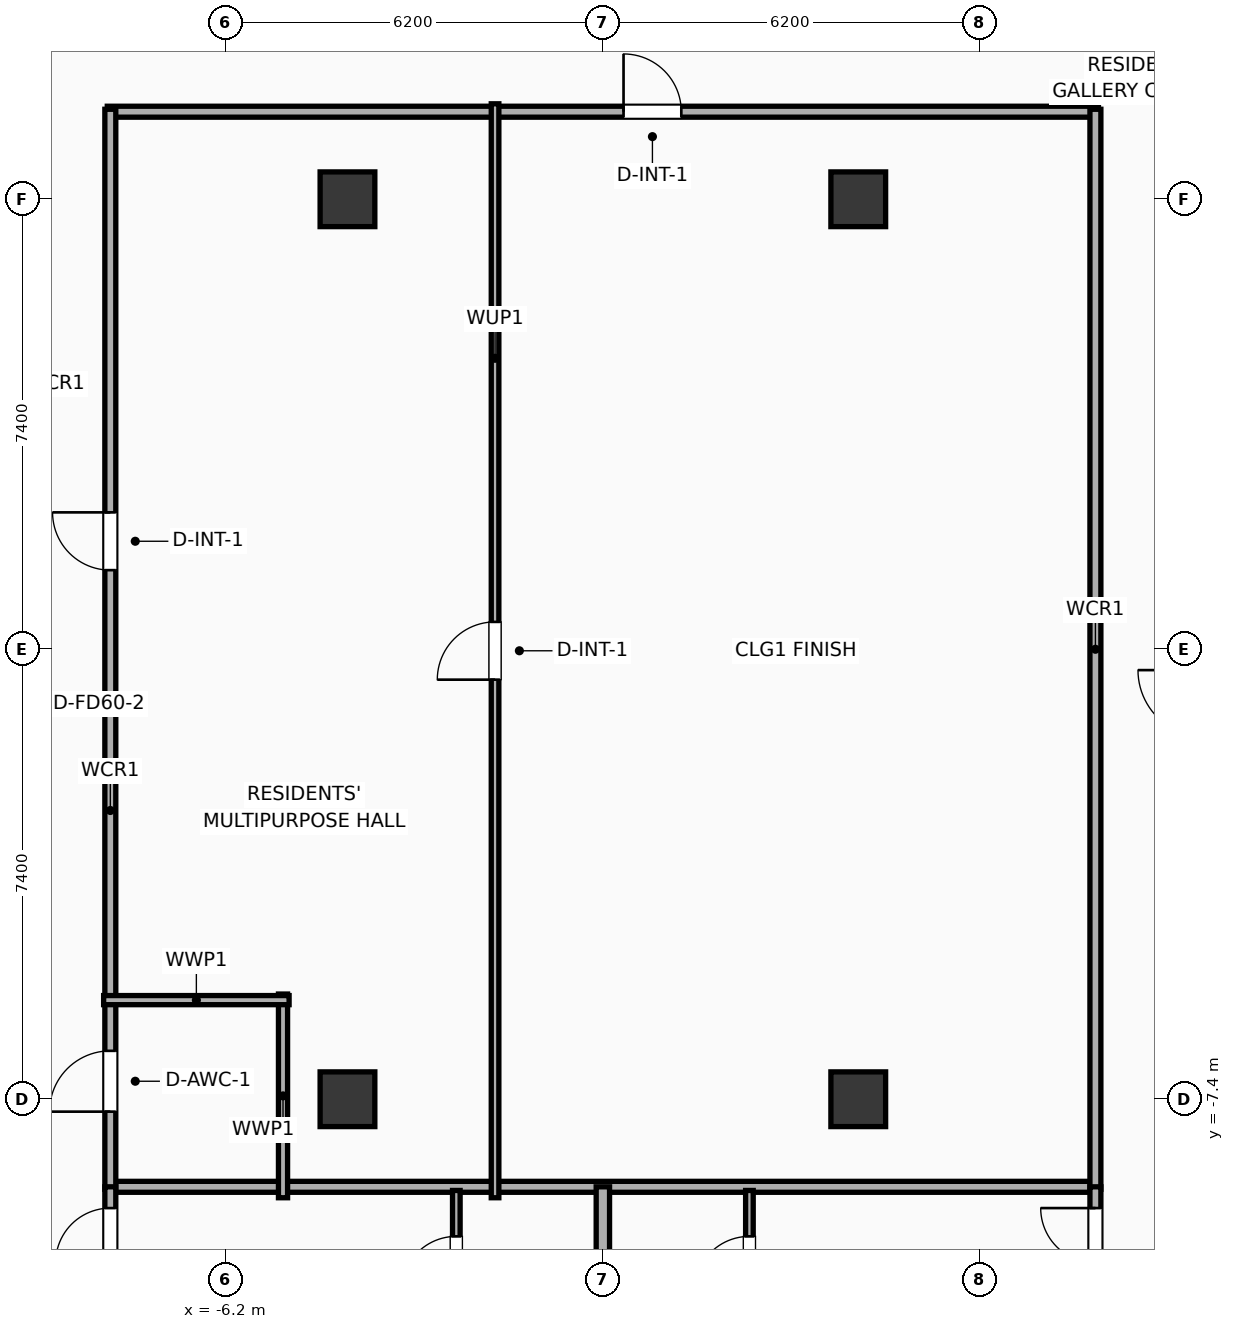
"""IFC4 building model, lengths in metres.
Left out: names, types, materials, properties, quantities, classifications, styles, units other than length and angle.
Written with IfcOpenShell. Run it as: python <this file> out.ifc"""

import sys

from ifc_helpers import new_model, si_unit, direction, frame, frame_2d, origin, origin_2d, place, context, subcontext, project, spatial, rectangle, extrude, element, fill, save


model = new_model("IFC4")
c1 = context("Model", 3, precision=1e-05, world=origin(), true_north=direction((0.0, 1.0)))
c2 = subcontext(c1, "Body", "Model", "MODEL_VIEW")
j1 = project(units=[si_unit("LENGTHUNIT", "METRE"), si_unit("PLANEANGLEUNIT", "RADIAN")], contexts=[c1])
p1 = place(None, origin())
s1 = spatial("IfcSite", under=j1, at=p1, CompositionType="ELEMENT")
p2 = place(p1, origin())
s2 = spatial("IfcBuilding", under=s1, at=p2, CompositionType="ELEMENT")
p3 = place(p2, frame((0.0, 0.0, 302.9)))
s3 = spatial("IfcBuildingStorey", under=s2, at=p3, CompositionType="ELEMENT", Elevation=302.9)
for number, where, z_axis, x_axis in (
    (1, (-4.2, -7.4, 0.0), (0.0, 0.0, 1.0), (1.0, 0.0, 0.0)),
    (2, (-4.2, 7.4, 0.0), (0.0, 0.0, 1.0), (1.0, 0.0, 0.0)),
    (3, (4.2, -7.4, 0.0), (0.0, 0.0, 1.0), (1.0, 0.0, 0.0)),
    (4, (4.2, 7.4, 0.0), (0.0, 0.0, 1.0), (1.0, 0.0, 0.0)),
):
    element("IfcColumn", number, at=place(p3, frame(where, z_axis=z_axis, x_axis=x_axis)), inside=s3, PredefinedType="COLUMN", context=c2, shape_type="SweptSolid", body=[
        extrude(rectangle(XDim=0.9, YDim=0.9, at=origin_2d()), origin(), (0.0, 0.0, 1.0), 3.9),
    ])
p4 = place(p3, frame((-8.15, 8.84, 0.0), z_axis=(0.0, 0.0, 1.0), x_axis=(1.0, 0.0, 0.0)))
e5 = element("IfcWall", 5, at=p4, inside=s3, PredefinedType="PARTITIONING", context=c2, shape_type="SweptSolid", body=[
    extrude(rectangle(XDim=16.3, YDim=0.18, at=frame_2d((8.15, 0.0))), origin(), (0.0, 0.0, 1.0), 3.635),
])
p5 = place(p4, frame((8.49, 0.0, 0.0)))
e6 = element("IfcOpeningElement", 6, at=p5, cuts=e5, PredefinedType="OPENING", context=c2, shape_type="SweptSolid", body=[
    extrude(rectangle(XDim=0.95, YDim=2.05, at=frame_2d((0.475, 1.025))), frame((0.0, 0.1, 0.0), z_axis=(0.0, -1.0, 0.0), x_axis=(1.0, 0.0, 0.0)), (0.0, 0.0, 1.0), 0.2),
])
p6 = place(p3, frame((-8.15, -8.84, 0.0), z_axis=(0.0, 0.0, 1.0), x_axis=(1.0, 0.0, 0.0)))
e7 = element("IfcWall", 7, at=p6, inside=s3, PredefinedType="PARTITIONING", context=c2, shape_type="SweptSolid", body=[
    extrude(rectangle(XDim=16.3, YDim=0.18, at=frame_2d((8.15, 0.0))), origin(), (0.0, 0.0, 1.0), 3.635),
])
p7 = place(p3, frame((-8.1, -8.88, 0.0), z_axis=(0.0, 0.0, 1.0), x_axis=(0.0, 1.0, 0.0)))
e8 = element("IfcWall", 8, at=p7, inside=s3, PredefinedType="PARTITIONING", context=c2, shape_type="SweptSolid", body=[
    extrude(rectangle(XDim=17.76, YDim=0.18, at=frame_2d((8.88, 0.0))), origin(), (0.0, 0.0, 1.0), 3.635),
])
p8 = place(p7, frame((1.276, 0.0, 0.0)))
e9 = element("IfcOpeningElement", 9, at=p8, cuts=e8, PredefinedType="OPENING", context=c2, shape_type="SweptSolid", body=[
    extrude(rectangle(XDim=1.0, YDim=2.05, at=frame_2d((0.5, 1.025))), frame((0.0, 0.1, 0.0), z_axis=(0.0, -1.0, 0.0), x_axis=(1.0, 0.0, 0.0)), (0.0, 0.0, 1.0), 0.2),
])
p9 = place(p7, frame((10.181, 0.0, 0.0)))
e10 = element("IfcOpeningElement", 10, at=p9, cuts=e8, PredefinedType="OPENING", context=c2, shape_type="SweptSolid", body=[
    extrude(rectangle(XDim=0.95, YDim=2.05, at=frame_2d((0.475, 1.025))), frame((0.0, 0.1, 0.0), z_axis=(0.0, -1.0, 0.0), x_axis=(1.0, 0.0, 0.0)), (0.0, 0.0, 1.0), 0.2),
])
p10 = place(p3, frame((8.1, -8.88, 0.0), z_axis=(0.0, 0.0, 1.0), x_axis=(0.0, 1.0, 0.0)))
e11 = element("IfcWall", 11, at=p10, inside=s3, PredefinedType="PARTITIONING", context=c2, shape_type="SweptSolid", body=[
    extrude(rectangle(XDim=17.76, YDim=0.18, at=frame_2d((8.88, 0.0))), origin(), (0.0, 0.0, 1.0), 3.635),
])
p11 = place(p3, frame((-5.26, -9.02, 0.0), z_axis=(0.0, 0.0, 1.0), x_axis=(0.0, 1.0, 0.0)))
e12 = element("IfcWall", 12, at=p11, inside=s3, PredefinedType="PLUMBINGWALL", context=c2, shape_type="SweptSolid", body=[
    extrude(rectangle(XDim=3.35, YDim=0.15, at=frame_2d((1.675, 0.0))), origin(), (0.0, 0.0, 1.0), 3.635),
])
p12 = place(p3, frame((-8.21, -5.77, 0.0), z_axis=(0.0, 0.0, 1.0), x_axis=(1.0, 0.0, 0.0)))
e13 = element("IfcWall", 13, at=p12, inside=s3, PredefinedType="PLUMBINGWALL", context=c2, shape_type="SweptSolid", body=[
    extrude(rectangle(XDim=3.05, YDim=0.15, at=frame_2d((1.525, 0.0))), origin(), (0.0, 0.0, 1.0), 3.635),
])
p13 = place(p3, frame((-1.773, -9.02, 0.0), z_axis=(0.0, 0.0, 1.0), x_axis=(0.0, 1.0, 0.0)))
e14 = element("IfcWall", 14, at=p13, inside=s3, PredefinedType="PARTITIONING", context=c2, shape_type="SweptSolid", body=[
    extrude(rectangle(XDim=17.99, YDim=0.125, at=frame_2d((8.995, 0.0))), origin(), (0.0, 0.0, 1.0), 3.635),
])
p14 = place(p13, frame((8.52, 0.0, 0.0)))
e15 = element("IfcOpeningElement", 15, at=p14, cuts=e14, PredefinedType="OPENING", context=c2, shape_type="SweptSolid", body=[
    extrude(rectangle(XDim=0.95, YDim=2.05, at=frame_2d((0.475, 1.025))), frame((0.0, 0.073, 0.0), z_axis=(0.0, -1.0, 0.0), x_axis=(1.0, 0.0, 0.0)), (0.0, 0.0, 1.0), 0.145),
])
p15 = place(p3, frame((-2.41, -11.31, 0.0), z_axis=(0.0, 0.0, 1.0), x_axis=(0.0, 1.0, 0.0)))
e16 = element("IfcWall", 16, at=p15, inside=s3, PredefinedType="PARTITIONING", context=c2, shape_type="SweptSolid", body=[
    extrude(rectangle(XDim=2.41, YDim=0.125, at=frame_2d((1.205, 0.0))), origin(), (0.0, 0.0, 1.0), 3.635),
])
p16 = place(p15, frame((0.755, 0.0, 0.0)))
e17 = element("IfcOpeningElement", 17, at=p16, cuts=e16, PredefinedType="OPENING", context=c2, shape_type="SweptSolid", body=[
    extrude(rectangle(XDim=0.9, YDim=2.05, at=frame_2d((0.45, 1.025))), frame((0.0, 0.073, 0.0), z_axis=(0.0, -1.0, 0.0), x_axis=(1.0, 0.0, 0.0)), (0.0, 0.0, 1.0), 0.145),
])
p17 = place(p3, frame((-8.1, -18.155, 0.0), z_axis=(0.0, 0.0, 1.0), x_axis=(0.0, 1.0, 0.0)))
e18 = element("IfcWall", 18, at=p17, inside=s3, PredefinedType="PARTITIONING", context=c2, shape_type="SweptSolid", body=[
    extrude(rectangle(XDim=9.314, YDim=0.18, at=frame_2d((4.657, 0.0))), origin(), (0.0, 0.0, 1.0), 3.635),
])
p18 = place(p17, frame((8.064, 0.0, 0.0)))
e19 = element("IfcOpeningElement", 19, at=p18, cuts=e18, PredefinedType="OPENING", context=c2, shape_type="SweptSolid", body=[
    extrude(rectangle(XDim=0.9, YDim=2.05, at=frame_2d((0.45, 1.025))), frame((0.0, 0.1, 0.0), z_axis=(0.0, -1.0, 0.0), x_axis=(1.0, 0.0, 0.0)), (0.0, 0.0, 1.0), 0.2),
])
p19 = place(p3, frame((2.41, -11.31, 0.0), z_axis=(0.0, 0.0, 1.0), x_axis=(0.0, 1.0, 0.0)))
e20 = element("IfcWall", 20, at=p19, inside=s3, PredefinedType="PARTITIONING", context=c2, shape_type="SweptSolid", body=[
    extrude(rectangle(XDim=2.41, YDim=0.125, at=frame_2d((1.205, 0.0))), origin(), (0.0, 0.0, 1.0), 3.635),
])
p20 = place(p19, frame((0.755, 0.0, 0.0)))
e21 = element("IfcOpeningElement", 21, at=p20, cuts=e20, PredefinedType="OPENING", context=c2, shape_type="SweptSolid", body=[
    extrude(rectangle(XDim=0.9, YDim=2.05, at=frame_2d((0.45, 1.025))), frame((0.0, 0.073, 0.0), z_axis=(0.0, -1.0, 0.0), x_axis=(1.0, 0.0, 0.0)), (0.0, 0.0, 1.0), 0.145),
])
p21 = place(p3, frame((8.1, -19.857, 0.0), z_axis=(0.0, 0.0, 1.0), x_axis=(0.0, 1.0, 0.0)))
e22 = element("IfcWall", 22, at=p21, inside=s3, PredefinedType="PARTITIONING", context=c2, shape_type="SweptSolid", body=[
    extrude(rectangle(XDim=11.017, YDim=0.18, at=frame_2d((5.509, 0.0))), origin(), (0.0, 0.0, 1.0), 3.635),
])
p22 = place(p21, frame((9.767, 0.0, 0.0)))
e23 = element("IfcOpeningElement", 23, at=p22, cuts=e22, PredefinedType="OPENING", context=c2, shape_type="SweptSolid", body=[
    extrude(rectangle(XDim=0.9, YDim=2.05, at=frame_2d((0.45, 1.025))), frame((0.0, 0.1, 0.0), z_axis=(0.0, -1.0, 0.0), x_axis=(1.0, 0.0, 0.0)), (0.0, 0.0, 1.0), 0.2),
])
p23 = place(p3, frame((0.0, -19.006, 0.0), z_axis=(0.0, 0.0, 1.0), x_axis=(0.0, 1.0, 0.0)))
e24 = element("IfcWall", 24, at=p23, inside=s3, PredefinedType="PARTITIONING", context=c2, shape_type="SweptSolid", body=[
    extrude(rectangle(XDim=10.166, YDim=0.22, at=frame_2d((5.083, 0.0))), origin(), (0.0, 0.0, 1.0), 3.635),
])
p24 = place(p5, origin())
e25 = element("IfcDoor", 25, at=p24, inside=s3, OperationType="SINGLE_SWING_LEFT", PredefinedType="DOOR", context=c2, shape_type="SweptSolid", body=[
    extrude(rectangle(XDim=0.95, YDim=2.05, at=frame_2d((0.475, 1.025))), frame((0.0, 0.025, 0.0), z_axis=(0.0, -1.0, 0.0), x_axis=(1.0, 0.0, 0.0)), (0.0, 0.0, 1.0), 0.05),
])
fill(e6, e25)
p25 = place(p8, origin())
e26 = element("IfcDoor", 26, at=p25, inside=s3, OperationType="SINGLE_SWING_LEFT", PredefinedType="DOOR", context=c2, shape_type="SweptSolid", body=[
    extrude(rectangle(XDim=1.0, YDim=2.05, at=frame_2d((0.5, 1.025))), frame((0.0, 0.025, 0.0), z_axis=(0.0, -1.0, 0.0), x_axis=(1.0, 0.0, 0.0)), (0.0, 0.0, 1.0), 0.05),
])
fill(e9, e26)
p26 = place(p9, origin())
e27 = element("IfcDoor", 27, at=p26, inside=s3, OperationType="SINGLE_SWING_RIGHT", PredefinedType="DOOR", context=c2, shape_type="SweptSolid", body=[
    extrude(rectangle(XDim=0.95, YDim=2.05, at=frame_2d((0.475, 1.025))), frame((0.0, 0.025, 0.0), z_axis=(0.0, -1.0, 0.0), x_axis=(1.0, 0.0, 0.0)), (0.0, 0.0, 1.0), 0.05),
])
fill(e10, e27)
p27 = place(p14, origin())
e28 = element("IfcDoor", 28, at=p27, inside=s3, OperationType="SINGLE_SWING_LEFT", PredefinedType="DOOR", context=c2, shape_type="SweptSolid", body=[
    extrude(rectangle(XDim=0.95, YDim=2.05, at=frame_2d((0.475, 1.025))), frame((0.0, 0.025, 0.0), z_axis=(0.0, -1.0, 0.0), x_axis=(1.0, 0.0, 0.0)), (0.0, 0.0, 1.0), 0.05),
])
fill(e15, e28)
p28 = place(p16, origin())
e29 = element("IfcDoor", 29, at=p28, inside=s3, OperationType="SINGLE_SWING_LEFT", PredefinedType="DOOR", context=c2, shape_type="SweptSolid", body=[
    extrude(rectangle(XDim=0.9, YDim=2.05, at=frame_2d((0.45, 1.025))), frame((0.0, 0.025, 0.0), z_axis=(0.0, -1.0, 0.0), x_axis=(1.0, 0.0, 0.0)), (0.0, 0.0, 1.0), 0.05),
])
fill(e17, e29)
p29 = place(p18, origin())
e30 = element("IfcDoor", 30, at=p29, inside=s3, OperationType="SINGLE_SWING_LEFT", PredefinedType="DOOR", context=c2, shape_type="SweptSolid", body=[
    extrude(rectangle(XDim=0.9, YDim=2.05, at=frame_2d((0.45, 1.025))), frame((0.0, 0.025, 0.0), z_axis=(0.0, -1.0, 0.0), x_axis=(1.0, 0.0, 0.0)), (0.0, 0.0, 1.0), 0.05),
])
fill(e19, e30)
p30 = place(p20, origin())
e31 = element("IfcDoor", 31, at=p30, inside=s3, OperationType="SINGLE_SWING_LEFT", PredefinedType="DOOR", context=c2, shape_type="SweptSolid", body=[
    extrude(rectangle(XDim=0.9, YDim=2.05, at=frame_2d((0.45, 1.025))), frame((0.0, 0.025, 0.0), z_axis=(0.0, -1.0, 0.0), x_axis=(1.0, 0.0, 0.0)), (0.0, 0.0, 1.0), 0.05),
])
fill(e21, e31)
p31 = place(p22, origin())
e32 = element("IfcDoor", 32, at=p31, inside=s3, OperationType="SINGLE_SWING_RIGHT", PredefinedType="DOOR", context=c2, shape_type="SweptSolid", body=[
    extrude(rectangle(XDim=0.9, YDim=2.05, at=frame_2d((0.45, 1.025))), frame((0.0, 0.025, 0.0), z_axis=(0.0, -1.0, 0.0), x_axis=(1.0, 0.0, 0.0)), (0.0, 0.0, 1.0), 0.05),
])
fill(e23, e32)
save(model, sys.argv[1])
